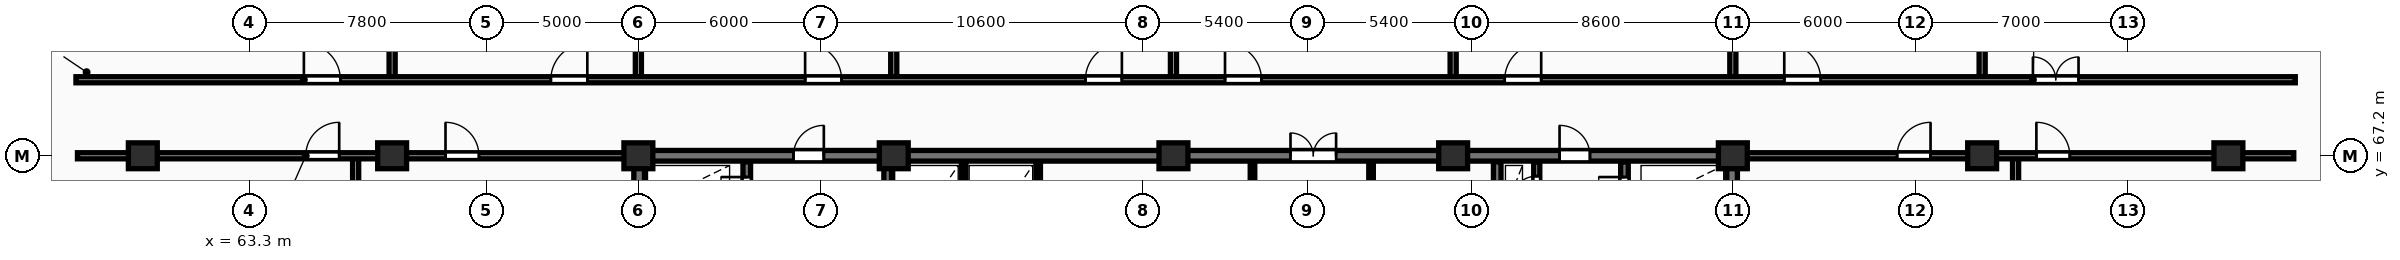
"""IFC4 building model, lengths in metres.
Left out: names, types, materials, properties, quantities, classifications, styles, units other than length and angle.
Written with IfcOpenShell. Run it as: python <this file> out.ifc"""

import sys

from ifc_helpers import new_model, si_unit, direction, frame, frame_2d, origin, origin_2d, place, context, subcontext, project, spatial, rectangle, extrude, element, fill, save


model = new_model("IFC4")
c1 = context("Model", 3, precision=1e-05, world=origin(), true_north=direction((0.0, 1.0)))
c2 = subcontext(c1, "Body", "Model", "MODEL_VIEW")
j1 = project(units=[si_unit("LENGTHUNIT", "METRE"), si_unit("PLANEANGLEUNIT", "RADIAN")], contexts=[c1])
p1 = place(None, origin())
s1 = spatial("IfcSite", under=j1, at=p1, CompositionType="ELEMENT")
p2 = place(p1, origin())
s2 = spatial("IfcBuilding", under=s1, at=p2, CompositionType="ELEMENT")
p3 = place(p2, frame((0.0, 0.0, 157.3)))
s3 = spatial("IfcBuildingStorey", under=s2, at=p3, CompositionType="ELEMENT", Elevation=157.3)
for number, where, z_axis, x_axis in (
    (1, (59.8, 67.2, 0.0), (0.0, 0.0, 1.0), (1.0, 0.0, 0.0)),
    (2, (68.0, 67.2, 0.0), (0.0, 0.0, 1.0), (1.0, 0.0, 0.0)),
    (3, (76.1, 67.2, 0.0), (0.0, 0.0, 1.0), (1.0, 0.0, 0.0)),
    (4, (84.5, 67.2, 0.0), (0.0, 0.0, 1.0), (1.0, 0.0, 0.0)),
    (5, (93.7, 67.2, 0.0), (0.0, 0.0, 1.0), (1.0, 0.0, 0.0)),
    (6, (102.9, 67.2, 0.0), (0.0, 0.0, 1.0), (1.0, 0.0, 0.0)),
    (7, (112.1, 67.2, 0.0), (0.0, 0.0, 1.0), (1.0, 0.0, 0.0)),
    (8, (120.3, 67.2, 0.0), (0.0, 0.0, 1.0), (1.0, 0.0, 0.0)),
    (9, (128.4, 67.2, 0.0), (0.0, 0.0, 1.0), (1.0, 0.0, 0.0)),
):
    element("IfcColumn", number, at=place(p3, frame(where, z_axis=z_axis, x_axis=x_axis)), inside=s3, PredefinedType="COLUMN", context=c2, shape_type="SweptSolid", body=[
        extrude(rectangle(XDim=0.95, YDim=0.85, at=origin_2d()), origin(), (0.0, 0.0, 1.0), 4.8),
    ])
for number, where, z_axis, x_axis in (
    (10, (76.125, 55.375, 0.0), (0.0, 0.0, 1.0), (0.0, 1.0, 0.0)),
    (11, (112.075, 55.375, 0.0), (0.0, 0.0, 1.0), (0.0, 1.0, 0.0)),
):
    element("IfcWall", number, at=place(p3, frame(where, z_axis=z_axis, x_axis=x_axis)), inside=s3, PredefinedType="SHEAR", context=c2, shape_type="SweptSolid", body=[
        extrude(rectangle(XDim=11.65, YDim=0.35, at=frame_2d((5.825, 0.0))), origin(), (0.0, 0.0, 1.0), 4.8),
    ])
p4 = place(p3, frame((75.95, 67.2, 0.0), z_axis=(0.0, 0.0, 1.0), x_axis=(1.0, 0.0, 0.0)))
e12 = element("IfcWall", 12, at=p4, inside=s3, PredefinedType="SHEAR", context=c2, shape_type="SweptSolid", body=[
    extrude(rectangle(XDim=36.3, YDim=0.35, at=frame_2d((18.15, 0.0))), origin(), (0.0, 0.0, 1.0), 4.8),
])
p5 = place(p4, frame((5.25, 0.0, 0.0)))
e13 = element("IfcOpeningElement", 13, at=p5, cuts=e12, PredefinedType="OPENING", context=c2, shape_type="SweptSolid", body=[
    extrude(rectangle(XDim=1.0, YDim=2.15, at=frame_2d((0.5, 1.075))), frame((0.0, 0.185, 0.0), z_axis=(0.0, -1.0, 0.0), x_axis=(1.0, 0.0, 0.0)), (0.0, 0.0, 1.0), 0.37),
])
p6 = place(p4, frame((21.6, 0.0, 0.0)))
e14 = element("IfcOpeningElement", 14, at=p6, cuts=e12, PredefinedType="OPENING", context=c2, shape_type="SweptSolid", body=[
    extrude(rectangle(XDim=1.5, YDim=2.2, at=frame_2d((0.75, 1.1))), frame((0.0, 0.185, 0.0), z_axis=(0.0, -1.0, 0.0), x_axis=(1.0, 0.0, 0.0)), (0.0, 0.0, 1.0), 0.37),
])
p7 = place(p4, frame((30.45, 0.0, 0.0)))
e15 = element("IfcOpeningElement", 15, at=p7, cuts=e12, PredefinedType="OPENING", context=c2, shape_type="SweptSolid", body=[
    extrude(rectangle(XDim=1.0, YDim=2.15, at=frame_2d((0.5, 1.075))), frame((0.0, 0.185, 0.0), z_axis=(0.0, -1.0, 0.0), x_axis=(1.0, 0.0, 0.0)), (0.0, 0.0, 1.0), 0.37),
])
p8 = place(p3, frame((79.665, 55.4, 0.0), z_axis=(0.0, 0.0, 1.0), x_axis=(0.0, 1.0, 0.0)))
e16 = element("IfcWall", 16, at=p8, inside=s3, PredefinedType="SHEAR", context=c2, shape_type="SweptSolid", body=[
    extrude(rectangle(XDim=11.6, YDim=0.25, at=frame_2d((5.8, 0.0))), origin(), (0.0, 0.0, 1.0), 4.8),
])
p9 = place(p8, frame((0.55, 0.0, 0.0)))
e17 = element("IfcOpeningElement", 17, at=p9, cuts=e16, PredefinedType="OPENING", context=c2, shape_type="SweptSolid", body=[
    extrude(rectangle(XDim=0.85, YDim=2.05, at=frame_2d((0.425, 1.025))), frame((0.0, 0.135, 0.0), z_axis=(0.0, -1.0, 0.0), x_axis=(1.0, 0.0, 0.0)), (0.0, 0.0, 1.0), 0.27),
])
p10 = place(p8, frame((8.4, 0.0, 0.0)))
e18 = element("IfcOpeningElement", 18, at=p10, cuts=e16, PredefinedType="OPENING", context=c2, shape_type="SweptSolid", body=[
    extrude(rectangle(XDim=1.1, YDim=2.1, at=frame_2d((0.55, 1.05))), frame((0.0, 0.135, 0.0), z_axis=(0.0, -1.0, 0.0), x_axis=(1.0, 0.0, 0.0)), (0.0, 0.0, 1.0), 0.27),
])
p11 = place(p8, frame((10.25, 0.0, 0.0)))
e19 = element("IfcOpeningElement", 19, at=p11, cuts=e16, PredefinedType="OPENING", context=c2, shape_type="SweptSolid", body=[
    extrude(rectangle(XDim=0.85, YDim=2.05, at=frame_2d((0.425, 1.025))), frame((0.0, 0.135, 0.0), z_axis=(0.0, -1.0, 0.0), x_axis=(1.0, 0.0, 0.0)), (0.0, 0.0, 1.0), 0.27),
])
p12 = place(p3, frame((84.3, 55.4, 0.0), z_axis=(0.0, 0.0, 1.0), x_axis=(0.0, 1.0, 0.0)))
e20 = element("IfcWall", 20, at=p12, inside=s3, PredefinedType="SHEAR", context=c2, shape_type="SweptSolid", body=[
    extrude(rectangle(XDim=11.6, YDim=0.25, at=frame_2d((5.8, 0.0))), origin(), (0.0, 0.0, 1.0), 4.8),
])
p13 = place(p12, frame((5.2, 0.0, 0.0)))
e21 = element("IfcOpeningElement", 21, at=p13, cuts=e20, PredefinedType="OPENING", context=c2, shape_type="SweptSolid", body=[
    extrude(rectangle(XDim=1.1, YDim=2.1, at=frame_2d((0.55, 1.05))), frame((0.0, 0.135, 0.0), z_axis=(0.0, -1.0, 0.0), x_axis=(1.0, 0.0, 0.0)), (0.0, 0.0, 1.0), 0.27),
])
for number, where, z_axis, x_axis in (
    (22, (86.8, 63.4, 0.0), (0.0, 0.0, 1.0), (0.0, 1.0, 0.0)),
    (23, (89.25, 63.4, 0.0), (0.0, 0.0, 1.0), (0.0, 1.0, 0.0)),
    (24, (96.3, 63.4, 0.0), (0.0, 0.0, 1.0), (0.0, 1.0, 0.0)),
    (25, (100.2, 63.4, 0.0), (0.0, 0.0, 1.0), (0.0, 1.0, 0.0)),
):
    element("IfcWall", number, at=place(p3, frame(where, z_axis=z_axis, x_axis=x_axis)), inside=s3, PredefinedType="PARTITIONING", context=c2, shape_type="SweptSolid", body=[
        extrude(rectangle(XDim=3.6, YDim=0.15, at=frame_2d((1.8, 0.0))), origin(), (0.0, 0.0, 1.0), 4.48),
    ])
p14 = place(p3, frame((105.65, 65.28, 0.0), z_axis=(0.0, 0.0, 1.0), x_axis=(0.0, 1.0, 0.0)))
e26 = element("IfcWall", 26, at=p14, inside=s3, PredefinedType="PARTITIONING", context=c2, shape_type="SweptSolid", body=[
    extrude(rectangle(XDim=1.72, YDim=0.2, at=frame_2d((0.86, 0.0))), origin(), (0.0, 0.0, 1.0), 4.48),
])
p15 = place(p14, frame((0.4, 0.0, 0.0)))
e27 = element("IfcOpeningElement", 27, at=p15, cuts=e26, PredefinedType="OPENING", context=c2, shape_type="SweptSolid", body=[
    extrude(rectangle(XDim=0.85, YDim=2.05, at=frame_2d((0.425, 1.025))), frame((0.0, 0.11, 0.0), z_axis=(0.0, -1.0, 0.0), x_axis=(1.0, 0.0, 0.0)), (0.0, 0.0, 1.0), 0.22),
])
p16 = place(p3, frame((104.35, 58.4, 0.0), z_axis=(0.0, 0.0, 1.0), x_axis=(0.0, 1.0, 0.0)))
e28 = element("IfcWall", 28, at=p16, inside=s3, PredefinedType="SHEAR", context=c2, shape_type="SweptSolid", body=[
    extrude(rectangle(XDim=8.6, YDim=0.25, at=frame_2d((4.3, 0.0))), origin(), (0.0, 0.0, 1.0), 4.8),
])
p17 = place(p16, frame((1.8, 0.0, 0.0)))
e29 = element("IfcOpeningElement", 29, at=p17, cuts=e28, PredefinedType="OPENING", context=c2, shape_type="SweptSolid", body=[
    extrude(rectangle(XDim=1.1, YDim=2.1, at=frame_2d((0.55, 1.05))), frame((0.0, 0.135, 0.0), z_axis=(0.0, -1.0, 0.0), x_axis=(1.0, 0.0, 0.0)), (0.0, 0.0, 1.0), 0.27),
])
p18 = place(p3, frame((108.535, 55.4, 0.0), z_axis=(0.0, 0.0, 1.0), x_axis=(0.0, 1.0, 0.0)))
e30 = element("IfcWall", 30, at=p18, inside=s3, PredefinedType="SHEAR", context=c2, shape_type="SweptSolid", body=[
    extrude(rectangle(XDim=11.6, YDim=0.25, at=frame_2d((5.8, 0.0))), origin(), (0.0, 0.0, 1.0), 4.8),
])
p19 = place(p18, frame((8.2, 0.0, 0.0)))
e31 = element("IfcOpeningElement", 31, at=p19, cuts=e30, PredefinedType="OPENING", context=c2, shape_type="SweptSolid", body=[
    extrude(rectangle(XDim=1.1, YDim=2.1, at=frame_2d((0.55, 1.05))), frame((0.0, 0.135, 0.0), z_axis=(0.0, -1.0, 0.0), x_axis=(1.0, 0.0, 0.0)), (0.0, 0.0, 1.0), 0.27),
])
p20 = place(p18, frame((10.25, 0.0, 0.0)))
e32 = element("IfcOpeningElement", 32, at=p20, cuts=e30, PredefinedType="OPENING", context=c2, shape_type="SweptSolid", body=[
    extrude(rectangle(XDim=0.85, YDim=2.05, at=frame_2d((0.425, 1.025))), frame((0.0, 0.135, 0.0), z_axis=(0.0, -1.0, 0.0), x_axis=(1.0, 0.0, 0.0)), (0.0, 0.0, 1.0), 0.27),
])
for number, where, z_axis, x_axis in (
    (33, (68.0, 69.8, 0.0), (0.0, 0.0, 1.0), (0.0, 1.0, 0.0)),
    (34, (76.1, 69.8, 0.0), (0.0, 0.0, 1.0), (0.0, 1.0, 0.0)),
    (35, (84.5, 69.8, 0.0), (0.0, 0.0, 1.0), (0.0, 1.0, 0.0)),
    (36, (93.7, 69.8, 0.0), (0.0, 0.0, 1.0), (0.0, 1.0, 0.0)),
    (37, (102.9, 69.8, 0.0), (0.0, 0.0, 1.0), (0.0, 1.0, 0.0)),
    (38, (112.1, 69.8, 0.0), (0.0, 0.0, 1.0), (0.0, 1.0, 0.0)),
    (39, (120.3, 69.8, 0.0), (0.0, 0.0, 1.0), (0.0, 1.0, 0.0)),
):
    element("IfcWall", number, at=place(p3, frame(where, z_axis=z_axis, x_axis=x_axis)), inside=s3, PredefinedType="PARTITIONING", context=c2, shape_type="SweptSolid", body=[
        extrude(rectangle(XDim=9.25, YDim=0.2, at=frame_2d((4.625, 0.0))), origin(), (0.0, 0.0, 1.0), 3.23),
    ])
p21 = place(p3, frame((57.6, 69.7, 0.0), z_axis=(0.0, 0.0, 1.0), x_axis=(1.0, 0.0, 0.0)))
e40 = element("IfcWall", 40, at=p21, inside=s3, PredefinedType="PARTITIONING", context=c2, shape_type="SweptSolid", body=[
    extrude(rectangle(XDim=73.0, YDim=0.2, at=frame_2d((36.5, 0.0))), origin(), (0.0, 0.0, 1.0), 4.48),
])
p22 = place(p21, frame((7.498, 0.0, 0.0)))
e41 = element("IfcOpeningElement", 41, at=p22, cuts=e40, PredefinedType="OPENING", context=c2, shape_type="SweptSolid", body=[
    extrude(rectangle(XDim=1.2, YDim=2.15, at=frame_2d((0.6, 1.075))), frame((0.0, 0.11, 0.0), z_axis=(0.0, -1.0, 0.0), x_axis=(1.0, 0.0, 0.0)), (0.0, 0.0, 1.0), 0.22),
])
p23 = place(p21, frame((15.621, 0.0, 0.0)))
e42 = element("IfcOpeningElement", 42, at=p23, cuts=e40, PredefinedType="OPENING", context=c2, shape_type="SweptSolid", body=[
    extrude(rectangle(XDim=1.2, YDim=2.15, at=frame_2d((0.6, 1.075))), frame((0.0, 0.11, 0.0), z_axis=(0.0, -1.0, 0.0), x_axis=(1.0, 0.0, 0.0)), (0.0, 0.0, 1.0), 0.22),
])
p24 = place(p21, frame((23.985, 0.0, 0.0)))
e43 = element("IfcOpeningElement", 43, at=p24, cuts=e40, PredefinedType="OPENING", context=c2, shape_type="SweptSolid", body=[
    extrude(rectangle(XDim=1.2, YDim=2.15, at=frame_2d((0.6, 1.075))), frame((0.0, 0.11, 0.0), z_axis=(0.0, -1.0, 0.0), x_axis=(1.0, 0.0, 0.0)), (0.0, 0.0, 1.0), 0.22),
])
p25 = place(p21, frame((33.204, 0.0, 0.0)))
e44 = element("IfcOpeningElement", 44, at=p25, cuts=e40, PredefinedType="OPENING", context=c2, shape_type="SweptSolid", body=[
    extrude(rectangle(XDim=1.2, YDim=2.15, at=frame_2d((0.6, 1.075))), frame((0.0, 0.11, 0.0), z_axis=(0.0, -1.0, 0.0), x_axis=(1.0, 0.0, 0.0)), (0.0, 0.0, 1.0), 0.22),
])
p26 = place(p21, frame((37.796, 0.0, 0.0)))
e45 = element("IfcOpeningElement", 45, at=p26, cuts=e40, PredefinedType="OPENING", context=c2, shape_type="SweptSolid", body=[
    extrude(rectangle(XDim=1.2, YDim=2.15, at=frame_2d((0.6, 1.075))), frame((0.0, 0.11, 0.0), z_axis=(0.0, -1.0, 0.0), x_axis=(1.0, 0.0, 0.0)), (0.0, 0.0, 1.0), 0.22),
])
p27 = place(p21, frame((46.996, 0.0, 0.0)))
e46 = element("IfcOpeningElement", 46, at=p27, cuts=e40, PredefinedType="OPENING", context=c2, shape_type="SweptSolid", body=[
    extrude(rectangle(XDim=1.2, YDim=2.15, at=frame_2d((0.6, 1.075))), frame((0.0, 0.11, 0.0), z_axis=(0.0, -1.0, 0.0), x_axis=(1.0, 0.0, 0.0)), (0.0, 0.0, 1.0), 0.22),
])
p28 = place(p21, frame((56.191, 0.0, 0.0)))
e47 = element("IfcOpeningElement", 47, at=p28, cuts=e40, PredefinedType="OPENING", context=c2, shape_type="SweptSolid", body=[
    extrude(rectangle(XDim=1.2, YDim=2.15, at=frame_2d((0.6, 1.075))), frame((0.0, 0.11, 0.0), z_axis=(0.0, -1.0, 0.0), x_axis=(1.0, 0.0, 0.0)), (0.0, 0.0, 1.0), 0.22),
])
p29 = place(p21, frame((64.37, 0.0, 0.0)))
e48 = element("IfcOpeningElement", 48, at=p29, cuts=e40, PredefinedType="OPENING", context=c2, shape_type="SweptSolid", body=[
    extrude(rectangle(XDim=1.5, YDim=2.18, at=frame_2d((0.75, 1.09))), frame((0.0, 0.11, 0.0), z_axis=(0.0, -1.0, 0.0), x_axis=(1.0, 0.0, 0.0)), (0.0, 0.0, 1.0), 0.22),
])
p30 = place(p3, frame((66.8, 50.95, 0.0), z_axis=(0.0, 0.0, 1.0), x_axis=(0.0, 1.0, 0.0)))
e49 = element("IfcWall", 49, at=p30, inside=s3, PredefinedType="PARTITIONING", context=c2, shape_type="SweptSolid", body=[
    extrude(rectangle(XDim=16.2, YDim=0.2, at=frame_2d((8.1, 0.0))), origin(), (0.0, 0.0, 1.0), 4.48),
])
p31 = place(p3, frame((57.65, 67.2, 0.0), z_axis=(0.0, 0.0, 1.0), x_axis=(1.0, 0.0, 0.0)))
e50 = element("IfcWall", 50, at=p31, inside=s3, PredefinedType="PARTITIONING", context=c2, shape_type="SweptSolid", body=[
    extrude(rectangle(XDim=18.3, YDim=0.2, at=frame_2d((9.15, 0.0))), origin(), (0.0, 0.0, 1.0), 3.23),
])
p32 = place(p31, frame((7.509, 0.0, 0.0)))
e51 = element("IfcOpeningElement", 51, at=p32, cuts=e50, PredefinedType="OPENING", context=c2, shape_type="SweptSolid", body=[
    extrude(rectangle(XDim=1.1, YDim=2.1, at=frame_2d((0.55, 1.05))), frame((0.0, 0.11, 0.0), z_axis=(0.0, -1.0, 0.0), x_axis=(1.0, 0.0, 0.0)), (0.0, 0.0, 1.0), 0.22),
])
p33 = place(p31, frame((12.106, 0.0, 0.0)))
e52 = element("IfcOpeningElement", 52, at=p33, cuts=e50, PredefinedType="OPENING", context=c2, shape_type="SweptSolid", body=[
    extrude(rectangle(XDim=1.1, YDim=2.1, at=frame_2d((0.55, 1.05))), frame((0.0, 0.11, 0.0), z_axis=(0.0, -1.0, 0.0), x_axis=(1.0, 0.0, 0.0)), (0.0, 0.0, 1.0), 0.22),
])
p34 = place(p3, frame((121.4, 50.95, 0.0), z_axis=(0.0, 0.0, 1.0), x_axis=(0.0, 1.0, 0.0)))
e53 = element("IfcWall", 53, at=p34, inside=s3, PredefinedType="PARTITIONING", context=c2, shape_type="SweptSolid", body=[
    extrude(rectangle(XDim=16.2, YDim=0.2, at=frame_2d((8.1, 0.0))), origin(), (0.0, 0.0, 1.0), 4.48),
])
p35 = place(p3, frame((112.25, 67.2, 0.0), z_axis=(0.0, 0.0, 1.0), x_axis=(1.0, 0.0, 0.0)))
e54 = element("IfcWall", 54, at=p35, inside=s3, PredefinedType="PARTITIONING", context=c2, shape_type="SweptSolid", body=[
    extrude(rectangle(XDim=18.3, YDim=0.2, at=frame_2d((9.15, 0.0))), origin(), (0.0, 0.0, 1.0), 3.23),
])
p36 = place(p35, frame((5.253, 0.0, 0.0)))
e55 = element("IfcOpeningElement", 55, at=p36, cuts=e54, PredefinedType="OPENING", context=c2, shape_type="SweptSolid", body=[
    extrude(rectangle(XDim=1.1, YDim=2.1, at=frame_2d((0.55, 1.05))), frame((0.0, 0.11, 0.0), z_axis=(0.0, -1.0, 0.0), x_axis=(1.0, 0.0, 0.0)), (0.0, 0.0, 1.0), 0.22),
])
p37 = place(p35, frame((9.834, 0.0, 0.0)))
e56 = element("IfcOpeningElement", 56, at=p37, cuts=e54, PredefinedType="OPENING", context=c2, shape_type="SweptSolid", body=[
    extrude(rectangle(XDim=1.1, YDim=2.1, at=frame_2d((0.55, 1.05))), frame((0.0, 0.11, 0.0), z_axis=(0.0, -1.0, 0.0), x_axis=(1.0, 0.0, 0.0)), (0.0, 0.0, 1.0), 0.22),
])
p38 = place(p5, origin())
e57 = element("IfcDoor", 57, at=p38, inside=s3, OperationType="SINGLE_SWING_RIGHT", PredefinedType="DOOR", context=c2, shape_type="SweptSolid", body=[
    extrude(rectangle(XDim=1.0, YDim=2.15, at=frame_2d((0.5, 1.075))), frame((0.0, 0.025, 0.0), z_axis=(0.0, -1.0, 0.0), x_axis=(1.0, 0.0, 0.0)), (0.0, 0.0, 1.0), 0.05),
])
fill(e13, e57)
p39 = place(p6, origin())
e58 = element("IfcDoor", 58, at=p39, inside=s3, OperationType="DOUBLE_DOOR_SINGLE_SWING", PredefinedType="DOOR", context=c2, shape_type="SweptSolid", body=[
    extrude(rectangle(XDim=1.5, YDim=2.2, at=frame_2d((0.75, 1.1))), frame((0.0, 0.025, 0.0), z_axis=(0.0, -1.0, 0.0), x_axis=(1.0, 0.0, 0.0)), (0.0, 0.0, 1.0), 0.05),
])
fill(e14, e58)
p40 = place(p7, origin())
e59 = element("IfcDoor", 59, at=p40, inside=s3, OperationType="SINGLE_SWING_LEFT", PredefinedType="DOOR", context=c2, shape_type="SweptSolid", body=[
    extrude(rectangle(XDim=1.0, YDim=2.15, at=frame_2d((0.5, 1.075))), frame((0.0, 0.025, 0.0), z_axis=(0.0, -1.0, 0.0), x_axis=(1.0, 0.0, 0.0)), (0.0, 0.0, 1.0), 0.05),
])
fill(e15, e59)
p41 = place(p11, origin())
e60 = element("IfcDoor", 60, at=p41, inside=s3, OperationType="SINGLE_SWING_RIGHT", PredefinedType="DOOR", context=c2, shape_type="SweptSolid", body=[
    extrude(rectangle(XDim=0.85, YDim=2.05, at=frame_2d((0.425, 1.025))), frame((0.0, 0.025, 0.0), z_axis=(0.0, -1.0, 0.0), x_axis=(1.0, 0.0, 0.0)), (0.0, 0.0, 1.0), 0.05),
])
fill(e19, e60)
p42 = place(p15, origin())
e61 = element("IfcDoor", 61, at=p42, inside=s3, OperationType="SINGLE_SWING_LEFT", PredefinedType="DOOR", context=c2, shape_type="SweptSolid", body=[
    extrude(rectangle(XDim=0.85, YDim=2.05, at=frame_2d((0.425, 1.025))), frame((0.0, 0.025, 0.0), z_axis=(0.0, -1.0, 0.0), x_axis=(1.0, 0.0, 0.0)), (0.0, 0.0, 1.0), 0.05),
])
fill(e27, e61)
p43 = place(p20, origin())
e62 = element("IfcDoor", 62, at=p43, inside=s3, OperationType="SINGLE_SWING_RIGHT", PredefinedType="DOOR", context=c2, shape_type="SweptSolid", body=[
    extrude(rectangle(XDim=0.85, YDim=2.05, at=frame_2d((0.425, 1.025))), frame((0.0, 0.025, 0.0), z_axis=(0.0, -1.0, 0.0), x_axis=(1.0, 0.0, 0.0)), (0.0, 0.0, 1.0), 0.05),
])
fill(e32, e62)
p44 = place(p22, origin())
e63 = element("IfcDoor", 63, at=p44, inside=s3, OperationType="SINGLE_SWING_LEFT", PredefinedType="DOOR", context=c2, shape_type="SweptSolid", body=[
    extrude(rectangle(XDim=1.2, YDim=2.15, at=frame_2d((0.6, 1.075))), frame((0.0, 0.025, 0.0), z_axis=(0.0, -1.0, 0.0), x_axis=(1.0, 0.0, 0.0)), (0.0, 0.0, 1.0), 0.05),
])
fill(e41, e63)
p45 = place(p23, origin())
e64 = element("IfcDoor", 64, at=p45, inside=s3, OperationType="SINGLE_SWING_RIGHT", PredefinedType="DOOR", context=c2, shape_type="SweptSolid", body=[
    extrude(rectangle(XDim=1.2, YDim=2.15, at=frame_2d((0.6, 1.075))), frame((0.0, 0.025, 0.0), z_axis=(0.0, -1.0, 0.0), x_axis=(1.0, 0.0, 0.0)), (0.0, 0.0, 1.0), 0.05),
])
fill(e42, e64)
p46 = place(p24, origin())
e65 = element("IfcDoor", 65, at=p46, inside=s3, OperationType="SINGLE_SWING_LEFT", PredefinedType="DOOR", context=c2, shape_type="SweptSolid", body=[
    extrude(rectangle(XDim=1.2, YDim=2.15, at=frame_2d((0.6, 1.075))), frame((0.0, 0.025, 0.0), z_axis=(0.0, -1.0, 0.0), x_axis=(1.0, 0.0, 0.0)), (0.0, 0.0, 1.0), 0.05),
])
fill(e43, e65)
p47 = place(p25, origin())
e66 = element("IfcDoor", 66, at=p47, inside=s3, OperationType="SINGLE_SWING_RIGHT", PredefinedType="DOOR", context=c2, shape_type="SweptSolid", body=[
    extrude(rectangle(XDim=1.2, YDim=2.15, at=frame_2d((0.6, 1.075))), frame((0.0, 0.025, 0.0), z_axis=(0.0, -1.0, 0.0), x_axis=(1.0, 0.0, 0.0)), (0.0, 0.0, 1.0), 0.05),
])
fill(e44, e66)
p48 = place(p26, origin())
e67 = element("IfcDoor", 67, at=p48, inside=s3, OperationType="SINGLE_SWING_LEFT", PredefinedType="DOOR", context=c2, shape_type="SweptSolid", body=[
    extrude(rectangle(XDim=1.2, YDim=2.15, at=frame_2d((0.6, 1.075))), frame((0.0, 0.025, 0.0), z_axis=(0.0, -1.0, 0.0), x_axis=(1.0, 0.0, 0.0)), (0.0, 0.0, 1.0), 0.05),
])
fill(e45, e67)
p49 = place(p27, origin())
e68 = element("IfcDoor", 68, at=p49, inside=s3, OperationType="SINGLE_SWING_RIGHT", PredefinedType="DOOR", context=c2, shape_type="SweptSolid", body=[
    extrude(rectangle(XDim=1.2, YDim=2.15, at=frame_2d((0.6, 1.075))), frame((0.0, 0.025, 0.0), z_axis=(0.0, -1.0, 0.0), x_axis=(1.0, 0.0, 0.0)), (0.0, 0.0, 1.0), 0.05),
])
fill(e46, e68)
p50 = place(p28, origin())
e69 = element("IfcDoor", 69, at=p50, inside=s3, OperationType="SINGLE_SWING_LEFT", PredefinedType="DOOR", context=c2, shape_type="SweptSolid", body=[
    extrude(rectangle(XDim=1.2, YDim=2.15, at=frame_2d((0.6, 1.075))), frame((0.0, 0.025, 0.0), z_axis=(0.0, -1.0, 0.0), x_axis=(1.0, 0.0, 0.0)), (0.0, 0.0, 1.0), 0.05),
])
fill(e47, e69)
p51 = place(p29, origin())
e70 = element("IfcDoor", 70, at=p51, inside=s3, OperationType="DOUBLE_DOOR_SINGLE_SWING", PredefinedType="DOOR", context=c2, shape_type="SweptSolid", body=[
    extrude(rectangle(XDim=1.5, YDim=2.18, at=frame_2d((0.75, 1.09))), frame((0.0, 0.025, 0.0), z_axis=(0.0, -1.0, 0.0), x_axis=(1.0, 0.0, 0.0)), (0.0, 0.0, 1.0), 0.05),
])
fill(e48, e70)
p52 = place(p32, origin())
e71 = element("IfcDoor", 71, at=p52, inside=s3, OperationType="SINGLE_SWING_RIGHT", PredefinedType="DOOR", context=c2, shape_type="SweptSolid", body=[
    extrude(rectangle(XDim=1.1, YDim=2.1, at=frame_2d((0.55, 1.05))), frame((0.0, 0.025, 0.0), z_axis=(0.0, -1.0, 0.0), x_axis=(1.0, 0.0, 0.0)), (0.0, 0.0, 1.0), 0.05),
])
fill(e51, e71)
p53 = place(p33, origin())
e72 = element("IfcDoor", 72, at=p53, inside=s3, OperationType="SINGLE_SWING_LEFT", PredefinedType="DOOR", context=c2, shape_type="SweptSolid", body=[
    extrude(rectangle(XDim=1.1, YDim=2.1, at=frame_2d((0.55, 1.05))), frame((0.0, 0.025, 0.0), z_axis=(0.0, -1.0, 0.0), x_axis=(1.0, 0.0, 0.0)), (0.0, 0.0, 1.0), 0.05),
])
fill(e52, e72)
p54 = place(p36, origin())
e73 = element("IfcDoor", 73, at=p54, inside=s3, OperationType="SINGLE_SWING_RIGHT", PredefinedType="DOOR", context=c2, shape_type="SweptSolid", body=[
    extrude(rectangle(XDim=1.1, YDim=2.1, at=frame_2d((0.55, 1.05))), frame((0.0, 0.025, 0.0), z_axis=(0.0, -1.0, 0.0), x_axis=(1.0, 0.0, 0.0)), (0.0, 0.0, 1.0), 0.05),
])
fill(e55, e73)
p55 = place(p37, origin())
e74 = element("IfcDoor", 74, at=p55, inside=s3, OperationType="SINGLE_SWING_LEFT", PredefinedType="DOOR", context=c2, shape_type="SweptSolid", body=[
    extrude(rectangle(XDim=1.1, YDim=2.1, at=frame_2d((0.55, 1.05))), frame((0.0, 0.025, 0.0), z_axis=(0.0, -1.0, 0.0), x_axis=(1.0, 0.0, 0.0)), (0.0, 0.0, 1.0), 0.05),
])
fill(e56, e74)
save(model, sys.argv[1])
